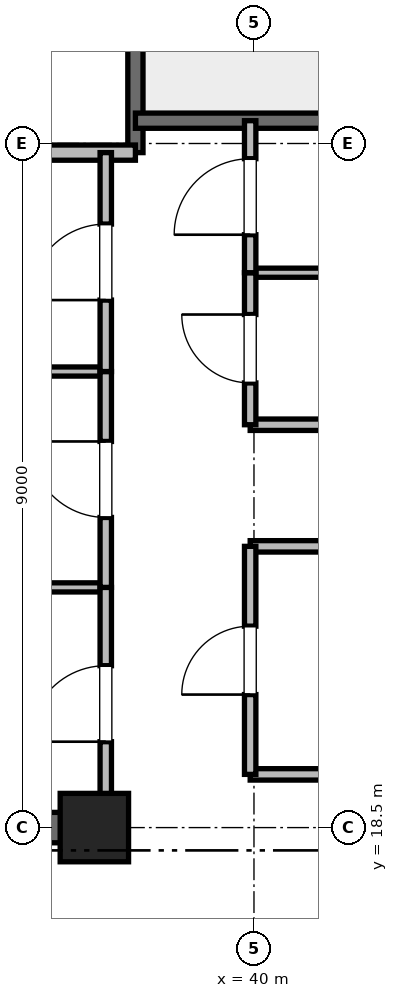
"""IFC4 building model, lengths in metres.
Left out: names, types, materials, properties, quantities, classifications, styles, units other than length and angle.
Written with IfcOpenShell. Run it as: python <this file> out.ifc"""

import sys

from ifc_helpers import new_model, si_unit, direction, frame, frame_2d, origin, origin_2d, place, context, subcontext, project, spatial, rectangle, extrude, element, fill, save


model = new_model("IFC4")
c1 = context("Model", 3, precision=1e-05, world=origin(), true_north=direction((0.0, 1.0)))
c2 = subcontext(c1, "Body", "Model", "MODEL_VIEW")
j1 = project(units=[si_unit("LENGTHUNIT", "METRE"), si_unit("PLANEANGLEUNIT", "RADIAN")], contexts=[c1])
p1 = place(None, origin())
s1 = spatial("IfcSite", under=j1, at=p1, CompositionType="ELEMENT")
p2 = place(p1, origin())
s2 = spatial("IfcBuilding", under=s1, at=p2, CompositionType="ELEMENT")
p3 = place(p2, frame((0.0, 0.0, 348.8)))
s3 = spatial("IfcBuildingStorey", under=s2, at=p3, CompositionType="ELEMENT", Elevation=348.8)
p4 = place(p3, frame((37.9, 18.5, 0.0), z_axis=(0.0, 0.0, 1.0), x_axis=(1.0, 0.0, 0.0)))
e1 = element("IfcColumn", 1, at=p4, inside=s3, PredefinedType="PILASTER", context=c2, shape_type="SweptSolid", body=[
    extrude(rectangle(XDim=0.9, YDim=0.9, at=origin_2d()), origin(), (0.0, 0.0, 1.0), 5.5),
])
p5 = place(p3, frame((29.0, 18.5, 0.0), z_axis=(0.0, 0.0, 1.0), x_axis=(1.0, 0.0, 0.0)))
e2 = element("IfcWall", 2, at=p5, inside=s3, PredefinedType="SHEAR", context=c2, shape_type="SweptSolid", body=[
    extrude(rectangle(XDim=9.2, YDim=0.4, at=frame_2d((4.6, 0.0))), origin(), (0.0, 0.0, 1.0), 5.2),
])
p6 = place(p3, frame((38.44, 27.38, 0.0), z_axis=(0.0, 0.0, 1.0), x_axis=(0.0, 1.0, 0.0)))
e3 = element("IfcWall", 3, at=p6, inside=s3, PredefinedType="SOLIDWALL", context=c2, shape_type="SweptSolid", body=[
    extrude(rectangle(XDim=8.87, YDim=0.2, at=frame_2d((4.435, 0.0))), origin(), (0.0, 0.0, 1.0), 5.2),
])
p7 = place(p3, frame((38.44, 27.8, 0.0), z_axis=(0.0, 0.0, 1.0), x_axis=(1.0, 0.0, 0.0)))
e4 = element("IfcWall", 4, at=p7, inside=s3, PredefinedType="SOLIDWALL", context=c2, shape_type="SweptSolid", body=[
    extrude(rectangle(XDim=3.32, YDim=0.2, at=frame_2d((1.66, 0.0))), origin(), (0.0, 0.0, 1.0), 5.2),
])
p8 = place(p3, frame((32.82, 27.38, 0.0), z_axis=(0.0, 0.0, 1.0), x_axis=(1.0, 0.0, 0.0)))
e5 = element("IfcWall", 5, at=p8, inside=s3, PredefinedType="PARTITIONING", context=c2, shape_type="SweptSolid", body=[
    extrude(rectangle(XDim=5.62, YDim=0.2, at=frame_2d((2.81, 0.0))), origin(), (0.0, 0.0, 1.0), 5.2),
])
for number, where, z_axis, x_axis in (
    (6, (39.95, 19.2, 0.0), (0.0, 0.0, 1.0), (1.0, 0.0, 0.0)),
    (7, (39.95, 22.2, 0.0), (0.0, 0.0, 1.0), (1.0, 0.0, 0.0)),
    (8, (39.95, 23.8, 0.0), (0.0, 0.0, 1.0), (1.0, 0.0, 0.0)),
):
    element("IfcWall", number, at=place(p3, frame(where, z_axis=z_axis, x_axis=x_axis)), inside=s3, PredefinedType="PARTITIONING", context=c2, shape_type="SweptSolid", body=[
        extrude(rectangle(XDim=1.81, YDim=0.15, at=frame_2d((0.905, 0.0))), origin(), (0.0, 0.0, 1.0), 2.85),
    ])
p9 = place(p3, frame((39.95, 25.8, 0.0), z_axis=(0.0, 0.0, 1.0), x_axis=(1.0, 0.0, 0.0)))
e9 = element("IfcWall", 9, at=p9, inside=s3, PredefinedType="PARTITIONING", context=c2, shape_type="SweptSolid", body=[
    extrude(rectangle(XDim=1.81, YDim=0.12, at=frame_2d((0.905, 0.0))), origin(), (0.0, 0.0, 1.0), 2.85),
])
p10 = place(p3, frame((39.95, 19.2, 0.0), z_axis=(0.0, 0.0, 1.0), x_axis=(0.0, 1.0, 0.0)))
e10 = element("IfcWall", 10, at=p10, inside=s3, PredefinedType="PARTITIONING", context=c2, shape_type="SweptSolid", body=[
    extrude(rectangle(XDim=3.0, YDim=0.15, at=frame_2d((1.5, 0.0))), origin(), (0.0, 0.0, 1.0), 2.85),
])
p11 = place(p10, frame((1.05, 0.0, 0.0)))
e11 = element("IfcOpeningElement", 11, at=p11, cuts=e10, PredefinedType="OPENING", context=c2, shape_type="SweptSolid", body=[
    extrude(rectangle(XDim=0.9, YDim=2.1, at=frame_2d((0.45, 1.05))), frame((0.0, 0.075, 0.0), z_axis=(0.0, -1.0, 0.0), x_axis=(1.0, 0.0, 0.0)), (0.0, 0.0, 1.0), 0.15),
])
p12 = place(p3, frame((39.95, 23.8, 0.0), z_axis=(0.0, 0.0, 1.0), x_axis=(0.0, 1.0, 0.0)))
e12 = element("IfcWall", 12, at=p12, inside=s3, PredefinedType="PARTITIONING", context=c2, shape_type="SweptSolid", body=[
    extrude(rectangle(XDim=2.0, YDim=0.15, at=frame_2d((1.0, 0.0))), origin(), (0.0, 0.0, 1.0), 2.85),
])
p13 = place(p12, frame((0.55, 0.0, 0.0)))
e13 = element("IfcOpeningElement", 13, at=p13, cuts=e12, PredefinedType="OPENING", context=c2, shape_type="SweptSolid", body=[
    extrude(rectangle(XDim=0.9, YDim=2.1, at=frame_2d((0.45, 1.05))), frame((0.0, 0.075, 0.0), z_axis=(0.0, -1.0, 0.0), x_axis=(1.0, 0.0, 0.0)), (0.0, 0.0, 1.0), 0.15),
])
p14 = place(p3, frame((39.95, 25.8, 0.0), z_axis=(0.0, 0.0, 1.0), x_axis=(0.0, 1.0, 0.0)))
e14 = element("IfcWall", 14, at=p14, inside=s3, PredefinedType="PARTITIONING", context=c2, shape_type="SweptSolid", body=[
    extrude(rectangle(XDim=2.0, YDim=0.15, at=frame_2d((1.0, 0.0))), origin(), (0.0, 0.0, 1.0), 2.85),
])
p15 = place(p14, frame((0.5, 0.0, 0.0)))
e15 = element("IfcOpeningElement", 15, at=p15, cuts=e14, PredefinedType="OPENING", context=c2, shape_type="SweptSolid", body=[
    extrude(rectangle(XDim=1.0, YDim=2.15, at=frame_2d((0.5, 1.075))), frame((0.0, 0.075, 0.0), z_axis=(0.0, -1.0, 0.0), x_axis=(1.0, 0.0, 0.0)), (0.0, 0.0, 1.0), 0.15),
])
for number, where, z_axis, x_axis in (
    (16, (32.82, 21.66, 0.0), (0.0, 0.0, 1.0), (1.0, 0.0, 0.0)),
    (17, (32.82, 24.5, 0.0), (0.0, 0.0, 1.0), (1.0, 0.0, 0.0)),
):
    element("IfcWall", number, at=place(p3, frame(where, z_axis=z_axis, x_axis=x_axis)), inside=s3, PredefinedType="PARTITIONING", context=c2, shape_type="SweptSolid", body=[
        extrude(rectangle(XDim=5.23, YDim=0.12, at=frame_2d((2.615, 0.0))), origin(), (0.0, 0.0, 1.0), 2.85),
    ])
p16 = place(p3, frame((38.05, 18.6, 0.0), z_axis=(0.0, 0.0, 1.0), x_axis=(0.0, 1.0, 0.0)))
e18 = element("IfcWall", 18, at=p16, inside=s3, PredefinedType="PARTITIONING", context=c2, shape_type="SweptSolid", body=[
    extrude(rectangle(XDim=3.06, YDim=0.15, at=frame_2d((1.53, 0.0))), origin(), (0.0, 0.0, 1.0), 2.85),
])
p17 = place(p16, frame((1.03, 0.0, 0.0)))
e19 = element("IfcOpeningElement", 19, at=p17, cuts=e18, PredefinedType="OPENING", context=c2, shape_type="SweptSolid", body=[
    extrude(rectangle(XDim=1.0, YDim=2.15, at=frame_2d((0.5, 1.075))), frame((0.0, 0.075, 0.0), z_axis=(0.0, -1.0, 0.0), x_axis=(1.0, 0.0, 0.0)), (0.0, 0.0, 1.0), 0.15),
])
p18 = place(p3, frame((38.05, 21.66, 0.0), z_axis=(0.0, 0.0, 1.0), x_axis=(0.0, 1.0, 0.0)))
e20 = element("IfcWall", 20, at=p18, inside=s3, PredefinedType="PARTITIONING", context=c2, shape_type="SweptSolid", body=[
    extrude(rectangle(XDim=2.84, YDim=0.15, at=frame_2d((1.42, 0.0))), origin(), (0.0, 0.0, 1.0), 2.85),
])
p19 = place(p18, frame((0.92, 0.0, 0.0)))
e21 = element("IfcOpeningElement", 21, at=p19, cuts=e20, PredefinedType="OPENING", context=c2, shape_type="SweptSolid", body=[
    extrude(rectangle(XDim=1.0, YDim=2.15, at=frame_2d((0.5, 1.075))), frame((0.0, 0.075, 0.0), z_axis=(0.0, -1.0, 0.0), x_axis=(1.0, 0.0, 0.0)), (0.0, 0.0, 1.0), 0.15),
])
p20 = place(p3, frame((38.05, 24.5, 0.0), z_axis=(0.0, 0.0, 1.0), x_axis=(0.0, 1.0, 0.0)))
e22 = element("IfcWall", 22, at=p20, inside=s3, PredefinedType="PARTITIONING", context=c2, shape_type="SweptSolid", body=[
    extrude(rectangle(XDim=2.88, YDim=0.15, at=frame_2d((1.44, 0.0))), origin(), (0.0, 0.0, 1.0), 2.85),
])
p21 = place(p20, frame((0.94, 0.0, 0.0)))
e23 = element("IfcOpeningElement", 23, at=p21, cuts=e22, PredefinedType="OPENING", context=c2, shape_type="SweptSolid", body=[
    extrude(rectangle(XDim=1.0, YDim=2.15, at=frame_2d((0.5, 1.075))), frame((0.0, 0.075, 0.0), z_axis=(0.0, -1.0, 0.0), x_axis=(1.0, 0.0, 0.0)), (0.0, 0.0, 1.0), 0.15),
])
p22 = place(p11, origin())
e24 = element("IfcDoor", 24, at=p22, inside=s3, OperationType="SINGLE_SWING_LEFT", PredefinedType="DOOR", context=c2, shape_type="SweptSolid", body=[
    extrude(rectangle(XDim=0.9, YDim=2.1, at=frame_2d((0.45, 1.05))), frame((0.0, 0.025, 0.0), z_axis=(0.0, -1.0, 0.0), x_axis=(1.0, 0.0, 0.0)), (0.0, 0.0, 1.0), 0.05),
])
fill(e11, e24)
p23 = place(p13, origin())
e25 = element("IfcDoor", 25, at=p23, inside=s3, OperationType="SINGLE_SWING_RIGHT", PredefinedType="DOOR", context=c2, shape_type="SweptSolid", body=[
    extrude(rectangle(XDim=0.9, YDim=2.1, at=frame_2d((0.45, 1.05))), frame((0.0, 0.025, 0.0), z_axis=(0.0, -1.0, 0.0), x_axis=(1.0, 0.0, 0.0)), (0.0, 0.0, 1.0), 0.05),
])
fill(e13, e25)
p24 = place(p15, origin())
e26 = element("IfcDoor", 26, at=p24, inside=s3, OperationType="SINGLE_SWING_LEFT", PredefinedType="DOOR", context=c2, shape_type="SweptSolid", body=[
    extrude(rectangle(XDim=1.0, YDim=2.15, at=frame_2d((0.5, 1.075))), frame((0.0, 0.025, 0.0), z_axis=(0.0, -1.0, 0.0), x_axis=(1.0, 0.0, 0.0)), (0.0, 0.0, 1.0), 0.05),
])
fill(e15, e26)
p25 = place(p17, origin())
e27 = element("IfcDoor", 27, at=p25, inside=s3, OperationType="SINGLE_SWING_LEFT", PredefinedType="DOOR", context=c2, shape_type="SweptSolid", body=[
    extrude(rectangle(XDim=1.0, YDim=2.15, at=frame_2d((0.5, 1.075))), frame((0.0, 0.025, 0.0), z_axis=(0.0, -1.0, 0.0), x_axis=(1.0, 0.0, 0.0)), (0.0, 0.0, 1.0), 0.05),
])
fill(e19, e27)
p26 = place(p19, origin())
e28 = element("IfcDoor", 28, at=p26, inside=s3, OperationType="SINGLE_SWING_RIGHT", PredefinedType="DOOR", context=c2, shape_type="SweptSolid", body=[
    extrude(rectangle(XDim=1.0, YDim=2.15, at=frame_2d((0.5, 1.075))), frame((0.0, 0.025, 0.0), z_axis=(0.0, -1.0, 0.0), x_axis=(1.0, 0.0, 0.0)), (0.0, 0.0, 1.0), 0.05),
])
fill(e21, e28)
p27 = place(p21, origin())
e29 = element("IfcDoor", 29, at=p27, inside=s3, OperationType="SINGLE_SWING_LEFT", PredefinedType="DOOR", context=c2, shape_type="SweptSolid", body=[
    extrude(rectangle(XDim=1.0, YDim=2.15, at=frame_2d((0.5, 1.075))), frame((0.0, 0.025, 0.0), z_axis=(0.0, -1.0, 0.0), x_axis=(1.0, 0.0, 0.0)), (0.0, 0.0, 1.0), 0.05),
])
fill(e23, e29)
save(model, sys.argv[1])
